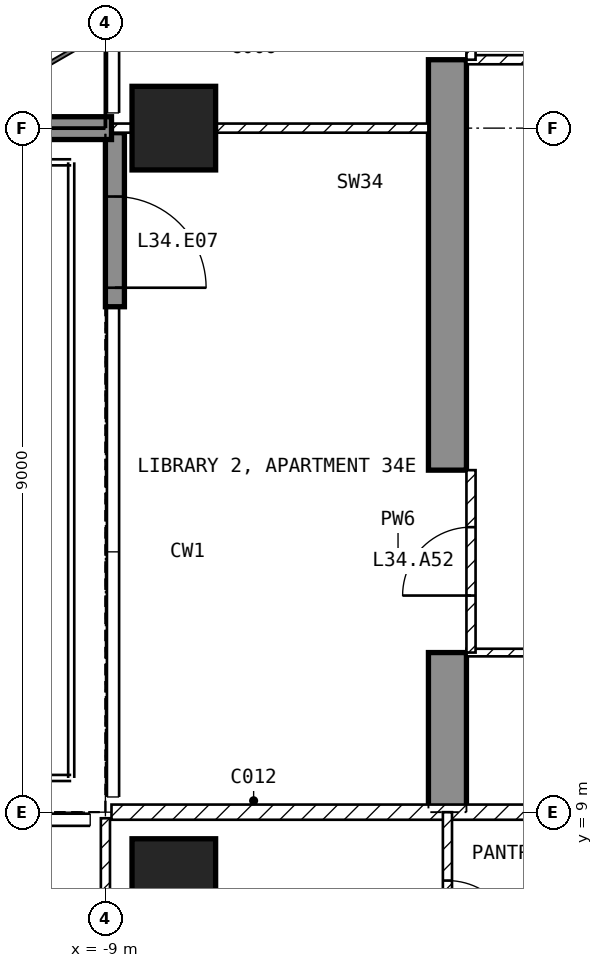
"""IFC4 building model, lengths in metres.
Left out: names, types, materials, properties, quantities, classifications, styles, units other than length and angle.
Written with IfcOpenShell. Run it as: python <this file> out.ifc"""

import sys

from ifc_helpers import new_model, si_unit, direction, frame, frame_2d, origin, origin_2d, place, context, subcontext, project, spatial, polyline, rectangle, outline, extrude, element, fill, save


model = new_model("IFC4")
c1 = context("Model", 3, precision=1e-05, world=origin(), true_north=direction((0.0, 1.0)))
c2 = subcontext(c1, "Body", "Model", "MODEL_VIEW")
j1 = project(units=[si_unit("LENGTHUNIT", "METRE"), si_unit("PLANEANGLEUNIT", "RADIAN")], contexts=[c1])
p1 = place(None, origin())
s1 = spatial("IfcSite", under=j1, at=p1, CompositionType="ELEMENT")
p2 = place(p1, origin())
s2 = spatial("IfcBuilding", under=s1, at=p2, CompositionType="ELEMENT")
p3 = place(p2, frame((0.0, 0.0, 140.9)))
s3 = spatial("IfcBuildingStorey", under=s2, at=p3, CompositionType="ELEMENT", Elevation=140.9)
for number, where, z_axis, x_axis in (
    (1, (-8.1, 8.1, -0.25), (0.0, 0.0, 1.0), (1.0, 0.0, 0.0)),
    (2, (-8.1, 18.0, -0.25), (0.0, 0.0, 1.0), (1.0, 0.0, 0.0)),
):
    element("IfcColumn", number, at=place(p3, frame(where, z_axis=z_axis, x_axis=x_axis)), inside=s3, PredefinedType="COLUMN", context=c2, shape_type="SweptSolid", body=[
        extrude(rectangle(XDim=1.1, YDim=1.1, at=origin_2d()), origin(), (0.0, 0.0, 1.0), 3.5),
    ])
p4 = place(p3, frame((-4.75, 9.0, -0.25), z_axis=(1.0, 0.0, 0.0), x_axis=(0.0, 1.0, 0.0)))
e3 = element("IfcWall", 3, at=p4, inside=s3, PredefinedType="SHEAR", context=c2, shape_type="SweptSolid", body=[
    extrude(outline(polyline([(0.0, 0.0), (2.1, 0.0), (2.1, 2.65), (4.5, 2.65), (4.5, 0.0), (9.9, 0.0), (9.9, 2.65), (12.3, 2.65), (12.3, 0.0), (16.55, 0.0), (16.55, 3.5), (0.0, 3.5), (0.0, 0.0)])), origin(), (0.0, 0.0, 1.0), 0.5),
])
p5 = place(p3, frame((-8.875, 17.94, 0.0), z_axis=(0.0, 0.0, 1.0), x_axis=(0.0, -1.0, 0.0)))
e4 = element("IfcWall", 4, at=p5, inside=s3, PredefinedType="SOLIDWALL", context=c2, shape_type="SweptSolid", body=[
    extrude(rectangle(XDim=2.29, YDim=0.25, at=frame_2d((1.145, 0.0))), origin(), (0.0, 0.0, 1.0), 3.25),
])
p6 = place(p5, frame((0.84, 0.0, 0.0)))
e5 = element("IfcOpeningElement", 5, at=p6, cuts=e4, PredefinedType="OPENING", context=c2, shape_type="SweptSolid", body=[
    extrude(rectangle(XDim=1.2, YDim=2.4, at=frame_2d((0.6, 1.2))), frame((0.0, 0.135, 0.0), z_axis=(0.0, -1.0, 0.0), x_axis=(1.0, 0.0, 0.0)), (0.0, 0.0, 1.0), 0.27),
])
p7 = place(p3, frame((-8.92, 18.0, 0.0), z_axis=(0.0, 0.0, 1.0), x_axis=(-1.0, 0.0, 0.0)))
e6 = element("IfcWall", 6, at=p7, inside=s3, PredefinedType="SOLIDWALL", context=c2, shape_type="SweptSolid", body=[
    extrude(rectangle(XDim=2.82, YDim=0.3, at=frame_2d((1.41, 0.0))), origin(), (0.0, 0.0, 1.0), 3.25),
])
p8 = place(p3, frame((-8.92, 9.0, 0.0), z_axis=(0.0, 0.0, 1.0), x_axis=(1.0, 0.0, 0.0)))
e7 = element("IfcWall", 7, at=p8, inside=s3, PredefinedType="PARTITIONING", context=c2, shape_type="SweptSolid", body=[
    extrude(rectangle(XDim=17.84, YDim=0.2, at=frame_2d((8.92, 0.0))), origin(), (0.0, 0.0, 1.0), 3.25),
])
p9 = place(p8, frame((8.42, 0.0, 0.0)))
e8 = element("IfcOpeningElement", 8, at=p9, cuts=e7, PredefinedType="OPENING", context=c2, shape_type="SweptSolid", body=[
    extrude(rectangle(XDim=1.0, YDim=2.1, at=frame_2d((0.5, 1.05))), frame((0.0, 0.11, 0.0), z_axis=(0.0, -1.0, 0.0), x_axis=(1.0, 0.0, 0.0)), (0.0, 0.0, 1.0), 0.22),
])
p10 = place(p3, frame((-9.0, 8.92, 0.0), z_axis=(0.0, 0.0, 1.0), x_axis=(0.0, -1.0, 0.0)))
e9 = element("IfcWall", 9, at=p10, inside=s3, PredefinedType="PARTITIONING", context=c2, shape_type="SweptSolid", body=[
    extrude(rectangle(XDim=7.62, YDim=0.12, at=frame_2d((3.81, 0.0))), origin(), (0.0, 0.0, 1.0), 3.25),
])
p11 = place(p10, frame((5.57, 0.0, 0.0)))
e10 = element("IfcOpeningElement", 10, at=p11, cuts=e9, PredefinedType="OPENING", context=c2, shape_type="SweptSolid", body=[
    extrude(rectangle(XDim=0.9, YDim=2.1, at=frame_2d((0.45, 1.05))), frame((0.0, 0.07, 0.0), z_axis=(0.0, -1.0, 0.0), x_axis=(1.0, 0.0, 0.0)), (0.0, 0.0, 1.0), 0.14),
])
p12 = place(p3, frame((-4.5, 9.0, 0.0), z_axis=(0.0, 0.0, 1.0), x_axis=(0.0, -1.0, 0.0)))
e11 = element("IfcWall", 11, at=p12, inside=s3, PredefinedType="PARTITIONING", context=c2, shape_type="SweptSolid", body=[
    extrude(rectangle(XDim=2.7, YDim=0.12, at=frame_2d((1.35, 0.0))), origin(), (0.0, 0.0, 1.0), 3.25),
])
p13 = place(p12, frame((0.9, 0.0, 0.0)))
e12 = element("IfcOpeningElement", 12, at=p13, cuts=e11, PredefinedType="OPENING", context=c2, shape_type="SweptSolid", body=[
    extrude(rectangle(XDim=0.9, YDim=2.1, at=frame_2d((0.45, 1.05))), frame((0.0, 0.07, 0.0), z_axis=(0.0, -1.0, 0.0), x_axis=(1.0, 0.0, 0.0)), (0.0, 0.0, 1.0), 0.14),
])
p14 = place(p3, frame((-4.25, 11.1, 0.0), z_axis=(0.0, 0.0, 1.0), x_axis=(1.0, 0.0, 0.0)))
e13 = element("IfcWall", 13, at=p14, inside=s3, PredefinedType="PARTITIONING", context=c2, shape_type="SweptSolid", body=[
    extrude(rectangle(XDim=2.15, YDim=0.1, at=frame_2d((1.075, 0.0))), origin(), (0.0, 0.0, 1.0), 3.25),
])
p15 = place(p3, frame((-4.25, 18.9, 0.0), z_axis=(0.0, 0.0, 1.0), x_axis=(1.0, 0.0, 0.0)))
e14 = element("IfcWall", 14, at=p15, inside=s3, PredefinedType="PARTITIONING", context=c2, shape_type="SweptSolid", body=[
    extrude(rectangle(XDim=8.5, YDim=0.12, at=frame_2d((4.25, 0.0))), origin(), (0.0, 0.0, 1.0), 3.25),
])
p16 = place(p15, frame((5.675, 0.0, 0.0)))
e15 = element("IfcOpeningElement", 15, at=p16, cuts=e14, PredefinedType="OPENING", context=c2, shape_type="SweptSolid", body=[
    extrude(rectangle(XDim=0.9, YDim=2.1, at=frame_2d((0.45, 1.05))), frame((0.0, 0.07, 0.0), z_axis=(0.0, -1.0, 0.0), x_axis=(1.0, 0.0, 0.0)), (0.0, 0.0, 1.0), 0.14),
])
p17 = place(p3, frame((-8.92, 18.0, 0.0), z_axis=(0.0, 0.0, 1.0), x_axis=(1.0, 0.0, 0.0)))
e16 = element("IfcWall", 16, at=p17, inside=s3, PredefinedType="PARTITIONING", context=c2, shape_type="SweptSolid", body=[
    extrude(rectangle(XDim=4.17, YDim=0.12, at=frame_2d((2.085, 0.0))), origin(), (0.0, 0.0, 1.0), 2.414),
])
p18 = place(p3, frame((-4.19, 11.1, 0.0), z_axis=(0.0, 0.0, 1.0), x_axis=(0.0, 1.0, 0.0)))
e17 = element("IfcWall", 17, at=p18, inside=s3, PredefinedType="PARTITIONING", context=c2, shape_type="SweptSolid", body=[
    extrude(rectangle(XDim=2.4, YDim=0.12, at=frame_2d((1.2, 0.0))), origin(), (0.0, 0.0, 1.0), 2.4),
])
p19 = place(p18, frame((0.75, 0.0, 0.0)))
e18 = element("IfcOpeningElement", 18, at=p19, cuts=e17, PredefinedType="OPENING", context=c2, shape_type="SweptSolid", body=[
    extrude(rectangle(XDim=0.9, YDim=2.1, at=frame_2d((0.45, 1.05))), frame((0.0, 0.07, 0.0), z_axis=(0.0, -1.0, 0.0), x_axis=(1.0, 0.0, 0.0)), (0.0, 0.0, 1.0), 0.14),
])
p20 = place(p3, frame((-4.19, 18.9, 0.0), z_axis=(0.0, 0.0, 1.0), x_axis=(0.0, 1.0, 0.0)))
e19 = element("IfcWall", 19, at=p20, inside=s3, PredefinedType="PARTITIONING", context=c2, shape_type="SweptSolid", body=[
    extrude(rectangle(XDim=2.4, YDim=0.12, at=frame_2d((1.2, 0.0))), origin(), (0.0, 0.0, 1.0), 2.4),
])
p21 = place(p20, frame((0.75, 0.0, 0.0)))
e20 = element("IfcOpeningElement", 20, at=p21, cuts=e19, PredefinedType="OPENING", context=c2, shape_type="SweptSolid", body=[
    extrude(rectangle(XDim=0.9, YDim=2.1, at=frame_2d((0.45, 1.05))), frame((0.0, 0.07, 0.0), z_axis=(0.0, -1.0, 0.0), x_axis=(1.0, 0.0, 0.0)), (0.0, 0.0, 1.0), 0.14),
])
p22 = place(p6, origin())
e21 = element("IfcDoor", 21, at=p22, inside=s3, OperationType="SINGLE_SWING_RIGHT", PredefinedType="DOOR", context=c2, shape_type="SweptSolid", body=[
    extrude(rectangle(XDim=1.2, YDim=2.4, at=frame_2d((0.6, 1.2))), frame((0.0, 0.025, 0.0), z_axis=(0.0, -1.0, 0.0), x_axis=(1.0, 0.0, 0.0)), (0.0, 0.0, 1.0), 0.05),
])
fill(e5, e21)
p23 = place(p13, origin())
e22 = element("IfcDoor", 22, at=p23, inside=s3, OperationType="SINGLE_SWING_RIGHT", PredefinedType="DOOR", context=c2, shape_type="SweptSolid", body=[
    extrude(rectangle(XDim=0.9, YDim=2.1, at=frame_2d((0.45, 1.05))), frame((0.0, 0.025, 0.0), z_axis=(0.0, -1.0, 0.0), x_axis=(1.0, 0.0, 0.0)), (0.0, 0.0, 1.0), 0.05),
])
fill(e12, e22)
p24 = place(p19, origin())
e23 = element("IfcDoor", 23, at=p24, inside=s3, OperationType="SINGLE_SWING_LEFT", PredefinedType="DOOR", context=c2, shape_type="SweptSolid", body=[
    extrude(rectangle(XDim=0.9, YDim=2.1, at=frame_2d((0.45, 1.05))), frame((0.0, 0.025, 0.0), z_axis=(0.0, -1.0, 0.0), x_axis=(1.0, 0.0, 0.0)), (0.0, 0.0, 1.0), 0.05),
])
fill(e18, e23)
save(model, sys.argv[1])
